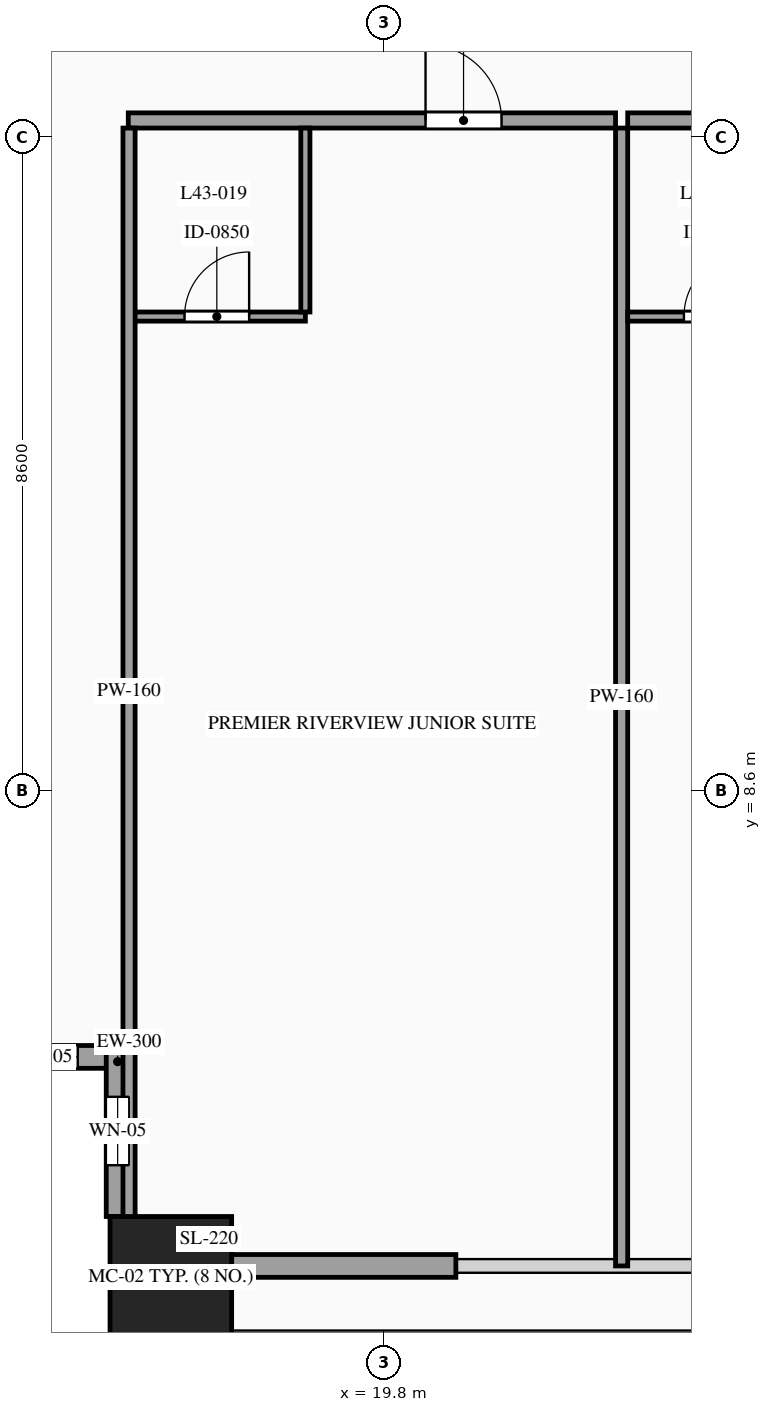
"""IFC4 building model, lengths in metres.
Left out: names, types, materials, properties, quantities, classifications, styles, units other than length and angle.
Written with IfcOpenShell. Run it as: python <this file> out.ifc"""

import sys

from ifc_helpers import new_model, si_unit, direction, frame, frame_2d, origin, origin_2d, place, context, subcontext, project, spatial, rectangle, hollow_rectangle, extrude, source, transform, mapped, element, fill, save


model = new_model("IFC4")
c1 = context("Model", 3, precision=1e-05, world=origin(), true_north=direction((0.0, 1.0)))
c2 = subcontext(c1, "Body", "Model", "MODEL_VIEW")
j1 = project(units=[si_unit("LENGTHUNIT", "METRE"), si_unit("PLANEANGLEUNIT", "RADIAN")], contexts=[c1])
p1 = place(None, origin())
s1 = spatial("IfcSite", under=j1, at=p1, CompositionType="ELEMENT")
p2 = place(p1, origin())
s2 = spatial("IfcBuilding", under=s1, at=p2, CompositionType="ELEMENT")
p3 = place(p2, frame((0.0, 0.0, 163.2)))
s3 = spatial("IfcBuildingStorey", under=s2, at=p3, CompositionType="ELEMENT", Elevation=163.2)
m1 = source(origin(), c2, "Body", "SweptSolid", [
    extrude(hollow_rectangle(XDim=1.6, YDim=1.6, WallThickness=0.07, at=origin_2d()), origin(), (0.0, 0.0, 1.0), 3.3),
])
p4 = place(p3, frame((17.0, 2.2, 0.0), z_axis=(0.0, 0.0, 1.0), x_axis=(1.0, 0.0, 0.0)))
e1 = element("IfcColumn", 1, at=p4, inside=s3, PredefinedType="COLUMN", context=c2, shape_type="MappedRepresentation", body=[
    mapped(m1, transform((0.0, 0.0, 0.0), scale=1.0)),
])
p5 = place(p3, frame((14.2, 5.1, 0.0), z_axis=(0.0, 0.0, 1.0), x_axis=(1.0, 0.0, 0.0)))
e2 = element("IfcWall", 2, at=p5, inside=s3, PredefinedType="SOLIDWALL", context=c2, shape_type="SweptSolid", body=[
    extrude(rectangle(XDim=2.25, YDim=0.3, at=frame_2d((1.125, 0.0))), origin(), (0.0, 0.0, 1.0), 3.3),
])
p6 = place(p5, frame((0.675, 0.0, 0.85)))
e3 = element("IfcOpeningElement", 3, at=p6, cuts=e2, PredefinedType="OPENING", context=c2, shape_type="SweptSolid", body=[
    extrude(rectangle(XDim=0.9, YDim=1.5, at=frame_2d((0.45, 0.75))), frame((0.0, 0.165, 0.0), z_axis=(0.0, -1.0, 0.0), x_axis=(1.0, 0.0, 0.0)), (0.0, 0.0, 1.0), 0.33),
])
p7 = place(p3, frame((16.3, 5.25, 0.0), z_axis=(0.0, 0.0, 1.0), x_axis=(0.0, -1.0, 0.0)))
e4 = element("IfcWall", 4, at=p7, inside=s3, PredefinedType="SOLIDWALL", context=c2, shape_type="SweptSolid", body=[
    extrude(rectangle(XDim=2.25, YDim=0.3, at=frame_2d((1.125, 0.0))), origin(), (0.0, 0.0, 1.0), 3.05),
])
p8 = place(p7, frame((0.675, 0.0, 0.75)))
e5 = element("IfcOpeningElement", 5, at=p8, cuts=e4, PredefinedType="OPENING", context=c2, shape_type="SweptSolid", body=[
    extrude(rectangle(XDim=0.9, YDim=1.5, at=frame_2d((0.45, 0.75))), frame((0.0, 0.165, 0.0), z_axis=(0.0, -1.0, 0.0), x_axis=(1.0, 0.0, 0.0)), (0.0, 0.0, 1.0), 0.33),
])
m2 = source(origin(), c2, "Body", "SweptSolid", [
    extrude(rectangle(XDim=2.95, YDim=0.3, at=frame_2d((1.475, 0.0))), origin(), (0.0, 0.0, 1.0), 2.445),
])
p9 = place(p3, frame((17.8, 2.35, 0.0), z_axis=(0.0, 0.0, 1.0), x_axis=(1.0, 0.0, 0.0)))
e6 = element("IfcWall", 6, at=p9, inside=s3, PredefinedType="SOLIDWALL", context=c2, shape_type="MappedRepresentation", body=[
    mapped(m2, transform((0.0, 0.0, 0.0), scale=1.0)),
])
p10 = place(p3, frame((16.44, 17.42, 0.0), z_axis=(0.0, 0.0, 1.0), x_axis=(1.0, 0.0, 0.0)))
e7 = element("IfcWall", 7, at=p10, inside=s3, PredefinedType="PARTITIONING", context=c2, shape_type="SweptSolid", body=[
    extrude(rectangle(XDim=6.411, YDim=0.2, at=frame_2d((3.206, 0.0))), origin(), (0.0, 0.0, 1.0), 3.05),
])
p11 = place(p10, frame((3.911, 0.0, 0.0)))
e8 = element("IfcOpeningElement", 8, at=p11, cuts=e7, PredefinedType="OPENING", context=c2, shape_type="SweptSolid", body=[
    extrude(rectangle(XDim=1.0, YDim=2.2, at=frame_2d((0.5, 1.1))), frame((0.0, 0.115, 0.0), z_axis=(0.0, -1.0, 0.0), x_axis=(1.0, 0.0, 0.0)), (0.0, 0.0, 1.0), 0.23),
])
m3 = source(origin(), c2, "Body", "SweptSolid", [
    extrude(rectangle(XDim=14.97, YDim=0.16, at=frame_2d((7.485, 0.0))), origin(), (0.0, 0.0, 1.0), 3.05),
])
p12 = place(p3, frame((22.931, 2.35, 0.0), z_axis=(0.0, 0.0, 1.0), x_axis=(0.0, 1.0, 0.0)))
e9 = element("IfcWall", 9, at=p12, inside=s3, PredefinedType="PARTITIONING", context=c2, shape_type="MappedRepresentation", body=[
    mapped(m3, transform((0.0, 0.0, 0.0), scale=1.0)),
])
p13 = place(p3, frame((16.44, 14.84, 0.0), z_axis=(0.0, 0.0, 1.0), x_axis=(1.0, 0.0, 0.0)))
e10 = element("IfcWall", 10, at=p13, inside=s3, PredefinedType="PARTITIONING", context=c2, shape_type="SweptSolid", body=[
    extrude(rectangle(XDim=2.33, YDim=0.12, at=frame_2d((1.165, 0.0))), origin(), (0.0, 0.0, 1.0), 3.05),
])
p14 = place(p13, frame((0.74, 0.0, 0.0)))
e11 = element("IfcOpeningElement", 11, at=p14, cuts=e10, PredefinedType="OPENING", context=c2, shape_type="SweptSolid", body=[
    extrude(rectangle(XDim=0.85, YDim=2.1, at=frame_2d((0.425, 1.05))), frame((0.0, 0.075, 0.0), z_axis=(0.0, -1.0, 0.0), x_axis=(1.0, 0.0, 0.0)), (0.0, 0.0, 1.0), 0.15),
])
m4 = source(origin(), c2, "Body", "SweptSolid", [
    extrude(rectangle(XDim=2.42, YDim=0.12, at=frame_2d((1.21, 0.0))), origin(), (0.0, 0.0, 1.0), 3.05),
])
p15 = place(p3, frame((18.77, 14.9, 0.0), z_axis=(0.0, 0.0, 1.0), x_axis=(0.0, 1.0, 0.0)))
e12 = element("IfcWall", 12, at=p15, inside=s3, PredefinedType="PARTITIONING", context=c2, shape_type="MappedRepresentation", body=[
    mapped(m4, transform((0.0, 0.0, 0.0), scale=1.0)),
])
p16 = place(p3, frame((23.011, 17.42, 0.0), z_axis=(0.0, 0.0, 1.0), x_axis=(1.0, 0.0, 0.0)))
e13 = element("IfcWall", 13, at=p16, inside=s3, PredefinedType="PARTITIONING", context=c2, shape_type="SweptSolid", body=[
    extrude(rectangle(XDim=4.727, YDim=0.2, at=frame_2d((2.364, 0.0))), origin(), (0.0, 0.0, 1.0), 3.05),
])
p17 = place(p16, frame((3.068, 0.0, 0.0)))
e14 = element("IfcOpeningElement", 14, at=p17, cuts=e13, PredefinedType="OPENING", context=c2, shape_type="SweptSolid", body=[
    extrude(rectangle(XDim=1.0, YDim=2.2, at=frame_2d((0.5, 1.1))), frame((0.0, 0.115, 0.0), z_axis=(0.0, -1.0, 0.0), x_axis=(1.0, 0.0, 0.0)), (0.0, 0.0, 1.0), 0.23),
])
p18 = place(p3, frame((23.011, 14.84, 0.0), z_axis=(0.0, 0.0, 1.0), x_axis=(1.0, 0.0, 0.0)))
e15 = element("IfcWall", 15, at=p18, inside=s3, PredefinedType="PARTITIONING", context=c2, shape_type="SweptSolid", body=[
    extrude(rectangle(XDim=2.33, YDim=0.12, at=frame_2d((1.165, 0.0))), origin(), (0.0, 0.0, 1.0), 3.05),
])
p19 = place(p18, frame((0.74, 0.0, 0.0)))
e16 = element("IfcOpeningElement", 16, at=p19, cuts=e15, PredefinedType="OPENING", context=c2, shape_type="SweptSolid", body=[
    extrude(rectangle(XDim=0.85, YDim=2.1, at=frame_2d((0.425, 1.05))), frame((0.0, 0.075, 0.0), z_axis=(0.0, -1.0, 0.0), x_axis=(1.0, 0.0, 0.0)), (0.0, 0.0, 1.0), 0.15),
])
m5 = source(origin(), c2, "Body", "SweptSolid", [
    extrude(rectangle(XDim=14.82, YDim=0.16, at=frame_2d((7.41, 0.0))), origin(), (0.0, 0.0, 1.0), 3.05),
])
p20 = place(p3, frame((16.45, 2.5, 0.0), z_axis=(0.0, 0.0, 1.0), x_axis=(0.0, 1.0, 0.0)))
e17 = element("IfcWall", 17, at=p20, inside=s3, PredefinedType="PARTITIONING", context=c2, shape_type="MappedRepresentation", body=[
    mapped(m5, transform((0.0, 0.0, 0.0), scale=1.0)),
])
m6 = source(origin(), c2, "Body", "SweptSolid", [
    extrude(rectangle(XDim=0.9, YDim=1.5, at=frame_2d((0.45, 0.75))), frame((0.0, 0.03, 0.0), z_axis=(0.0, -1.0, 0.0), x_axis=(1.0, 0.0, 0.0)), (0.0, 0.0, 1.0), 0.06),
])
p21 = place(p6, origin())
e18 = element("IfcWindow", 18, at=p21, inside=s3, PartitioningType="SINGLE_PANEL", PredefinedType="WINDOW", context=c2, shape_type="MappedRepresentation", body=[
    mapped(m6, transform((0.0, 0.0, 0.0), scale=1.0)),
])
fill(e3, e18)
p22 = place(p8, origin())
e19 = element("IfcWindow", 19, at=p22, inside=s3, PartitioningType="SINGLE_PANEL", PredefinedType="WINDOW", context=c2, shape_type="MappedRepresentation", body=[
    mapped(m6, transform((0.0, 0.0, 0.0), scale=1.0)),
])
fill(e5, e19)
m7 = source(origin(), c2, "Body", "SweptSolid", [
    extrude(rectangle(XDim=1.0, YDim=2.2, at=frame_2d((0.5, 1.1))), frame((0.0, 0.025, 0.0), z_axis=(0.0, -1.0, 0.0), x_axis=(1.0, 0.0, 0.0)), (0.0, 0.0, 1.0), 0.05),
])
p23 = place(p11, origin())
e20 = element("IfcDoor", 20, at=p23, inside=s3, OperationType="SINGLE_SWING_LEFT", PredefinedType="DOOR", context=c2, shape_type="MappedRepresentation", body=[
    mapped(m7, transform((0.0, 0.0, 0.0), scale=1.0)),
])
fill(e8, e20)
m8 = source(origin(), c2, "Body", "SweptSolid", [
    extrude(rectangle(XDim=0.85, YDim=2.1, at=frame_2d((0.425, 1.05))), frame((0.0, 0.025, 0.0), z_axis=(0.0, -1.0, 0.0), x_axis=(1.0, 0.0, 0.0)), (0.0, 0.0, 1.0), 0.05),
])
p24 = place(p14, origin())
e21 = element("IfcDoor", 21, at=p24, inside=s3, OperationType="SINGLE_SWING_RIGHT", PredefinedType="DOOR", context=c2, shape_type="MappedRepresentation", body=[
    mapped(m8, transform((0.0, 0.0, 0.0), scale=1.0)),
])
fill(e11, e21)
p25 = place(p19, origin())
e22 = element("IfcDoor", 22, at=p25, inside=s3, OperationType="SINGLE_SWING_RIGHT", PredefinedType="DOOR", context=c2, shape_type="MappedRepresentation", body=[
    mapped(m8, transform((0.0, 0.0, 0.0), scale=1.0)),
])
fill(e16, e22)
save(model, sys.argv[1])
